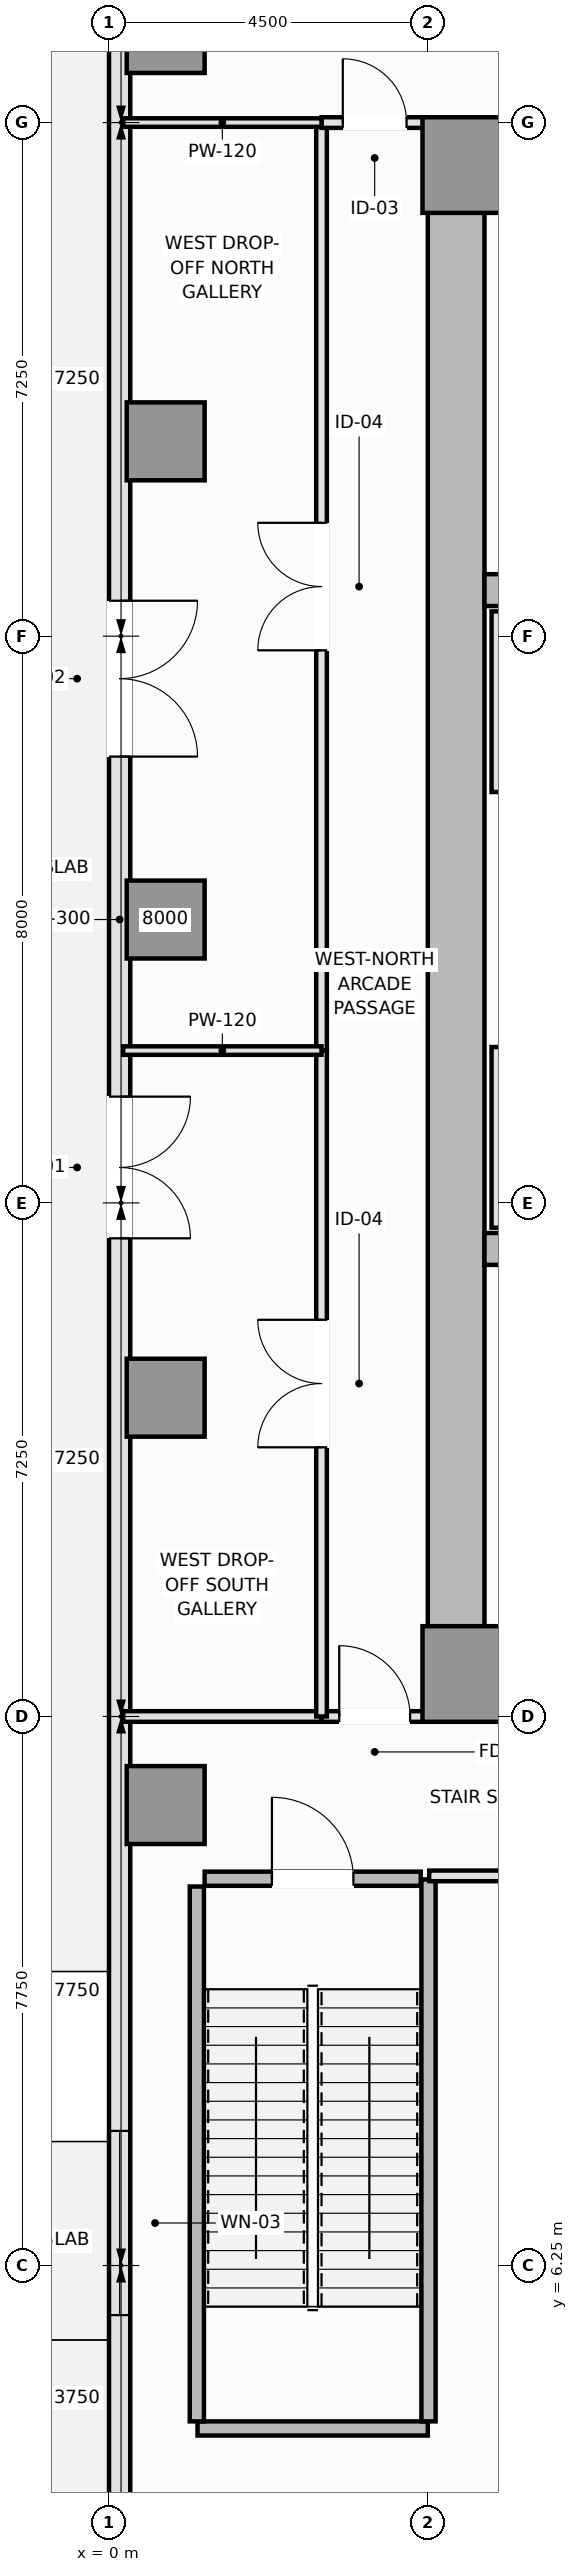
"""IFC4 building model, lengths in metres.
Left out: names, types, materials, properties, quantities, classifications, styles, units other than length and angle.
Written with IfcOpenShell. Run it as: python <this file> out.ifc"""

import sys

from ifc_helpers import new_model, si_unit, direction, frame, frame_2d, origin, origin_2d, place, context, subcontext, project, spatial, rectangle, extrude, element, fill, save


model = new_model("IFC4")
c1 = context("Model", 3, precision=1e-05, world=origin(), true_north=direction((0.0, 1.0)))
c2 = subcontext(c1, "Body", "Model", "MODEL_VIEW")
j1 = project(units=[si_unit("LENGTHUNIT", "METRE"), si_unit("PLANEANGLEUNIT", "RADIAN")], contexts=[c1])
p1 = place(None, origin())
s1 = spatial("IfcSite", under=j1, at=p1, CompositionType="ELEMENT")
p2 = place(p1, origin())
s2 = spatial("IfcBuilding", under=s1, at=p2, CompositionType="ELEMENT")
p3 = place(p2, origin())
s3 = spatial("IfcBuildingStorey", under=s2, at=p3, CompositionType="ELEMENT", Elevation=0.0)
for number, where, z_axis, x_axis in (
    (1, (4.5, 14.4, 0.0), (0.0, 0.0, 1.0), (1.0, 0.0, 0.0)),
    (2, (4.5, 36.1, 0.0), (0.0, 0.0, 1.0), (1.0, 0.0, 0.0)),
):
    element("IfcWall", number, at=place(p3, frame(where, z_axis=z_axis, x_axis=x_axis)), inside=s3, PredefinedType="SHEAR", context=c2, shape_type="SweptSolid", body=[
        extrude(rectangle(XDim=13.5, YDim=0.8, at=frame_2d((6.75, 0.0))), origin(), (0.0, 0.0, 1.0), 6.0),
    ])
p4 = place(p3, frame((4.9, 14.8, 0.0), z_axis=(0.0, 0.0, 1.0), x_axis=(0.0, 1.0, 0.0)))
e3 = element("IfcWall", 3, at=p4, inside=s3, PredefinedType="SHEAR", context=c2, shape_type="SweptSolid", body=[
    extrude(rectangle(XDim=20.9, YDim=0.8, at=frame_2d((10.45, 0.0))), origin(), (0.0, 0.0, 1.0), 6.0),
])
for number, where, z_axis, x_axis in (
    (4, (5.3, 20.6, 0.0), (0.0, 0.0, 1.0), (1.0, 0.0, 0.0)),
    (5, (5.3, 29.9, 0.0), (0.0, 0.0, 1.0), (1.0, 0.0, 0.0)),
):
    element("IfcWall", number, at=place(p3, frame(where, z_axis=z_axis, x_axis=x_axis)), inside=s3, PredefinedType="SHEAR", context=c2, shape_type="SweptSolid", body=[
        extrude(rectangle(XDim=11.9, YDim=0.45, at=frame_2d((5.95, 0.0))), origin(), (0.0, 0.0, 1.0), 6.0),
    ])
for number, where, z_axis, x_axis in (
    (6, (5.1, 14.6, 0.0), (0.0, 0.0, 1.0), (1.0, 0.0, 0.0)),
    (7, (5.1, 35.9, 0.0), (0.0, 0.0, 1.0), (1.0, 0.0, 0.0)),
):
    element("IfcColumn", number, at=place(p3, frame(where, z_axis=z_axis, x_axis=x_axis)), inside=s3, PredefinedType="PILASTER", context=c2, shape_type="SweptSolid", body=[
        extrude(rectangle(XDim=1.35, YDim=1.35, at=origin_2d()), origin(), (0.0, 0.0, 1.0), 6.0),
    ])
for number, where, z_axis, x_axis in (
    (8, (0.8, 12.75, 0.0), (0.0, 0.0, 1.0), (1.0, 0.0, 0.0)),
    (9, (0.8, 18.5, 0.0), (0.0, 0.0, 1.0), (1.0, 0.0, 0.0)),
    (10, (0.8, 25.25, 0.0), (0.0, 0.0, 1.0), (1.0, 0.0, 0.0)),
    (11, (0.8, 32.0, 0.0), (0.0, 0.0, 1.0), (1.0, 0.0, 0.0)),
    (12, (0.8, 37.75, 0.0), (0.0, 0.0, 1.0), (1.0, 0.0, 0.0)),
):
    element("IfcColumn", number, at=place(p3, frame(where, z_axis=z_axis, x_axis=x_axis)), inside=s3, PredefinedType="COLUMN", context=c2, shape_type="SweptSolid", body=[
        extrude(rectangle(XDim=1.1, YDim=1.1, at=origin_2d()), origin(), (0.0, 0.0, 1.0), 6.0),
    ])
p5 = place(p3, frame((0.15, 50.35, 0.0), z_axis=(0.0, 0.0, 1.0), x_axis=(0.0, -1.0, 0.0)))
e13 = element("IfcWall", 13, at=p5, inside=s3, PredefinedType="SOLIDWALL", context=c2, shape_type="SweptSolid", body=[
    extrude(rectangle(XDim=50.2, YDim=0.3, at=frame_2d((25.1, 0.0))), origin(), (0.0, 0.0, 1.0), 5.8),
])
p6 = place(p5, frame((5.35, 0.0, 0.0)))
e14 = element("IfcOpeningElement", 14, at=p6, cuts=e13, PredefinedType="OPENING", context=c2, shape_type="SweptSolid", body=[
    extrude(rectangle(XDim=2.0, YDim=2.4, at=frame_2d((1.0, 1.2))), frame((0.0, 0.16, 0.0), z_axis=(0.0, -1.0, 0.0), x_axis=(1.0, 0.0, 0.0)), (0.0, 0.0, 1.0), 0.32),
])
p7 = place(p5, frame((20.6, 0.0, 0.0)))
e15 = element("IfcOpeningElement", 15, at=p7, cuts=e13, PredefinedType="OPENING", context=c2, shape_type="SweptSolid", body=[
    extrude(rectangle(XDim=2.2, YDim=2.5, at=frame_2d((1.1, 1.25))), frame((0.0, 0.16, 0.0), z_axis=(0.0, -1.0, 0.0), x_axis=(1.0, 0.0, 0.0)), (0.0, 0.0, 1.0), 0.32),
])
p8 = place(p5, frame((27.6, 0.0, 0.0)))
e16 = element("IfcOpeningElement", 16, at=p8, cuts=e13, PredefinedType="OPENING", context=c2, shape_type="SweptSolid", body=[
    extrude(rectangle(XDim=2.0, YDim=2.4, at=frame_2d((1.0, 1.2))), frame((0.0, 0.16, 0.0), z_axis=(0.0, -1.0, 0.0), x_axis=(1.0, 0.0, 0.0)), (0.0, 0.0, 1.0), 0.32),
])
p9 = place(p5, frame((8.5, 0.0, 0.9)))
e17 = element("IfcOpeningElement", 17, at=p9, cuts=e13, PredefinedType="OPENING", context=c2, shape_type="SweptSolid", body=[
    extrude(rectangle(XDim=2.6, YDim=2.2, at=frame_2d((1.3, 1.1))), frame((0.0, 0.16, 0.0), z_axis=(0.0, -1.0, 0.0), x_axis=(1.0, 0.0, 0.0)), (0.0, 0.0, 1.0), 0.32),
])
p10 = place(p5, frame((42.2, 0.0, 0.9)))
e18 = element("IfcOpeningElement", 18, at=p10, cuts=e13, PredefinedType="OPENING", context=c2, shape_type="SweptSolid", body=[
    extrude(rectangle(XDim=2.6, YDim=2.2, at=frame_2d((1.3, 1.1))), frame((0.0, 0.16, 0.0), z_axis=(0.0, -1.0, 0.0), x_axis=(1.0, 0.0, 0.0)), (0.0, 0.0, 1.0), 0.32),
])
p11 = place(p3, frame((1.25, 3.95, 0.0), z_axis=(0.0, 0.0, 1.0), x_axis=(1.0, 0.0, 0.0)))
e19 = element("IfcWall", 19, at=p11, inside=s3, PredefinedType="SOLIDWALL", context=c2, shape_type="SweptSolid", body=[
    extrude(rectangle(XDim=3.25, YDim=0.2, at=frame_2d((1.625, 0.0))), origin(), (0.0, 0.0, 1.0), 6.0),
])
p12 = place(p3, frame((1.24, 4.05, 0.0), z_axis=(0.0, 0.0, 1.0), x_axis=(0.0, 1.0, 0.0)))
e20 = element("IfcWall", 20, at=p12, inside=s3, PredefinedType="SOLIDWALL", context=c2, shape_type="SweptSolid", body=[
    extrude(rectangle(XDim=7.55, YDim=0.2, at=frame_2d((3.775, 0.0))), origin(), (0.0, 0.0, 1.0), 6.0),
])
p13 = place(p3, frame((4.51, 4.05, 0.0), z_axis=(0.0, 0.0, 1.0), x_axis=(0.0, 1.0, 0.0)))
e21 = element("IfcWall", 21, at=p13, inside=s3, PredefinedType="SOLIDWALL", context=c2, shape_type="SweptSolid", body=[
    extrude(rectangle(XDim=7.65, YDim=0.2, at=frame_2d((3.825, 0.0))), origin(), (0.0, 0.0, 1.0), 6.0),
])
p14 = place(p3, frame((1.35, 11.71, 0.0), z_axis=(0.0, 0.0, 1.0), x_axis=(1.0, 0.0, 0.0)))
e22 = element("IfcWall", 22, at=p14, inside=s3, PredefinedType="SOLIDWALL", context=c2, shape_type="SweptSolid", body=[
    extrude(rectangle(XDim=3.05, YDim=0.2, at=frame_2d((1.525, 0.0))), origin(), (0.0, 0.0, 1.0), 6.0),
])
p15 = place(p14, frame((0.95, 0.0, 0.0)))
e23 = element("IfcOpeningElement", 23, at=p15, cuts=e22, PredefinedType="OPENING", context=c2, shape_type="SweptSolid", body=[
    extrude(rectangle(XDim=1.15, YDim=2.15, at=frame_2d((0.575, 1.075))), frame((0.0, 0.11, 0.0), z_axis=(0.0, -1.0, 0.0), x_axis=(1.0, 0.0, 0.0)), (0.0, 0.0, 1.0), 0.22),
])
for number, where, z_axis, x_axis in (
    (24, (5.475, 20.9, 0.0), (0.0, 0.0, 1.0), (0.0, 1.0, 0.0)),
    (25, (5.475, 27.05, 0.0), (0.0, 0.0, 1.0), (0.0, 1.0, 0.0)),
):
    element("IfcWall", number, at=place(p3, frame(where, z_axis=z_axis, x_axis=x_axis)), inside=s3, PredefinedType="PARTITIONING", context=c2, shape_type="SweptSolid", body=[
        extrude(rectangle(XDim=2.55, YDim=0.15, at=frame_2d((1.275, 0.0))), origin(), (0.0, 0.0, 1.0), 5.8),
    ])
p16 = place(p3, frame((3.0, 14.0, 0.0), z_axis=(0.0, 0.0, 1.0), x_axis=(1.0, 0.0, 0.0)))
e26 = element("IfcWall", 26, at=p16, inside=s3, PredefinedType="PARTITIONING", context=c2, shape_type="SweptSolid", body=[
    extrude(rectangle(XDim=1.5, YDim=0.15, at=frame_2d((0.75, 0.0))), origin(), (0.0, 0.0, 1.0), 5.8),
])
p17 = place(p16, frame((0.25, 0.0, 0.0)))
e27 = element("IfcOpeningElement", 27, at=p17, cuts=e26, PredefinedType="OPENING", context=c2, shape_type="SweptSolid", body=[
    extrude(rectangle(XDim=1.0, YDim=2.15, at=frame_2d((0.5, 1.075))), frame((0.0, 0.085, 0.0), z_axis=(0.0, -1.0, 0.0), x_axis=(1.0, 0.0, 0.0)), (0.0, 0.0, 1.0), 0.17),
])
p18 = place(p3, frame((4.52, 11.75, 0.0), z_axis=(0.0, 0.0, 1.0), x_axis=(1.0, 0.0, 0.0)))
e28 = element("IfcWall", 28, at=p18, inside=s3, PredefinedType="PARTITIONING", context=c2, shape_type="SweptSolid", body=[
    extrude(rectangle(XDim=8.08, YDim=0.15, at=frame_2d((4.04, 0.0))), origin(), (0.0, 0.0, 1.0), 5.8),
])
p19 = place(p18, frame((3.54, 0.0, 0.0)))
e29 = element("IfcOpeningElement", 29, at=p19, cuts=e28, PredefinedType="OPENING", context=c2, shape_type="SweptSolid", body=[
    extrude(rectangle(XDim=1.0, YDim=2.15, at=frame_2d((0.5, 1.075))), frame((0.0, 0.085, 0.0), z_axis=(0.0, -1.0, 0.0), x_axis=(1.0, 0.0, 0.0)), (0.0, 0.0, 1.0), 0.17),
])
p20 = place(p3, frame((0.2, 14.0, 0.0), z_axis=(0.0, 0.0, 1.0), x_axis=(1.0, 0.0, 0.0)))
e30 = element("IfcWall", 30, at=p20, inside=s3, PredefinedType="PARTITIONING", context=c2, shape_type="SweptSolid", body=[
    extrude(rectangle(XDim=2.8, YDim=0.15, at=frame_2d((1.4, 0.0))), origin(), (0.0, 0.0, 1.0), 5.8),
])
p21 = place(p3, frame((3.0, 14.0, 0.0), z_axis=(0.0, 0.0, 1.0), x_axis=(0.0, 1.0, 0.0)))
e31 = element("IfcWall", 31, at=p21, inside=s3, PredefinedType="PARTITIONING", context=c2, shape_type="SweptSolid", body=[
    extrude(rectangle(XDim=9.4, YDim=0.15, at=frame_2d((4.7, 0.0))), origin(), (0.0, 0.0, 1.0), 5.8),
])
p22 = place(p21, frame((3.8, 0.0, 0.0)))
e32 = element("IfcOpeningElement", 32, at=p22, cuts=e31, PredefinedType="OPENING", context=c2, shape_type="SweptSolid", body=[
    extrude(rectangle(XDim=1.8, YDim=2.2, at=frame_2d((0.9, 1.1))), frame((0.0, 0.085, 0.0), z_axis=(0.0, -1.0, 0.0), x_axis=(1.0, 0.0, 0.0)), (0.0, 0.0, 1.0), 0.17),
])
p23 = place(p3, frame((3.0, 23.4, 0.0), z_axis=(0.0, 0.0, 1.0), x_axis=(0.0, 1.0, 0.0)))
e33 = element("IfcWall", 33, at=p23, inside=s3, PredefinedType="PARTITIONING", context=c2, shape_type="SweptSolid", body=[
    extrude(rectangle(XDim=13.1, YDim=0.15, at=frame_2d((6.55, 0.0))), origin(), (0.0, 0.0, 1.0), 5.8),
])
p24 = place(p23, frame((5.65, 0.0, 0.0)))
e34 = element("IfcOpeningElement", 34, at=p24, cuts=e33, PredefinedType="OPENING", context=c2, shape_type="SweptSolid", body=[
    extrude(rectangle(XDim=1.8, YDim=2.2, at=frame_2d((0.9, 1.1))), frame((0.0, 0.085, 0.0), z_axis=(0.0, -1.0, 0.0), x_axis=(1.0, 0.0, 0.0)), (0.0, 0.0, 1.0), 0.17),
])
p25 = place(p3, frame((3.0, 36.5, 0.0), z_axis=(0.0, 0.0, 1.0), x_axis=(1.0, 0.0, 0.0)))
e35 = element("IfcWall", 35, at=p25, inside=s3, PredefinedType="PARTITIONING", context=c2, shape_type="SweptSolid", body=[
    extrude(rectangle(XDim=1.5, YDim=0.15, at=frame_2d((0.75, 0.0))), origin(), (0.0, 0.0, 1.0), 5.8),
])
p26 = place(p25, frame((0.3, 0.0, 0.0)))
e36 = element("IfcOpeningElement", 36, at=p26, cuts=e35, PredefinedType="OPENING", context=c2, shape_type="SweptSolid", body=[
    extrude(rectangle(XDim=0.9, YDim=2.1, at=frame_2d((0.45, 1.05))), frame((0.0, 0.085, 0.0), z_axis=(0.0, -1.0, 0.0), x_axis=(1.0, 0.0, 0.0)), (0.0, 0.0, 1.0), 0.17),
])
for number, where, z_axis, x_axis in (
    (37, (0.2, 23.4, 0.0), (0.0, 0.0, 1.0), (1.0, 0.0, 0.0)),
    (38, (0.2, 36.5, 0.0), (0.0, 0.0, 1.0), (1.0, 0.0, 0.0)),
):
    element("IfcWall", number, at=place(p3, frame(where, z_axis=z_axis, x_axis=x_axis)), inside=s3, PredefinedType="PARTITIONING", context=c2, shape_type="SweptSolid", body=[
        extrude(rectangle(XDim=2.8, YDim=0.12, at=frame_2d((1.4, 0.0))), origin(), (0.0, 0.0, 1.0), 5.8),
    ])
p27 = place(p7, frame((2.2, 0.0, 0.0), z_axis=(0.0, 0.0, 1.0), x_axis=(-1.0, 0.0, 0.0)))
e39 = element("IfcDoor", 39, at=p27, inside=s3, OperationType="DOUBLE_DOOR_SINGLE_SWING", PredefinedType="DOOR", context=c2, shape_type="SweptSolid", body=[
    extrude(rectangle(XDim=2.2, YDim=2.5, at=frame_2d((1.1, 1.25))), frame((0.0, 0.025, 0.0), z_axis=(0.0, -1.0, 0.0), x_axis=(1.0, 0.0, 0.0)), (0.0, 0.0, 1.0), 0.05),
])
fill(e15, e39)
p28 = place(p8, frame((2.0, 0.0, 0.0), z_axis=(0.0, 0.0, 1.0), x_axis=(-1.0, 0.0, 0.0)))
e40 = element("IfcDoor", 40, at=p28, inside=s3, OperationType="DOUBLE_DOOR_SINGLE_SWING", PredefinedType="DOOR", context=c2, shape_type="SweptSolid", body=[
    extrude(rectangle(XDim=2.0, YDim=2.4, at=frame_2d((1.0, 1.2))), frame((0.0, 0.025, 0.0), z_axis=(0.0, -1.0, 0.0), x_axis=(1.0, 0.0, 0.0)), (0.0, 0.0, 1.0), 0.05),
])
fill(e16, e40)
p29 = place(p10, origin())
e41 = element("IfcWindow", 41, at=p29, inside=s3, PartitioningType="SINGLE_PANEL", PredefinedType="WINDOW", context=c2, shape_type="SweptSolid", body=[
    extrude(rectangle(XDim=2.6, YDim=2.2, at=frame_2d((1.3, 1.1))), frame((0.0, 0.03, 0.0), z_axis=(0.0, -1.0, 0.0), x_axis=(1.0, 0.0, 0.0)), (0.0, 0.0, 1.0), 0.06),
])
fill(e18, e41)
p30 = place(p15, origin())
e42 = element("IfcDoor", 42, at=p30, inside=s3, OperationType="SINGLE_SWING_LEFT", PredefinedType="DOOR", context=c2, shape_type="SweptSolid", body=[
    extrude(rectangle(XDim=1.15, YDim=2.15, at=frame_2d((0.575, 1.075))), frame((0.0, 0.025, 0.0), z_axis=(0.0, -1.0, 0.0), x_axis=(1.0, 0.0, 0.0)), (0.0, 0.0, 1.0), 0.05),
])
fill(e23, e42)
p31 = place(p17, origin())
e43 = element("IfcDoor", 43, at=p31, inside=s3, OperationType="SINGLE_SWING_LEFT", PredefinedType="DOOR", context=c2, shape_type="SweptSolid", body=[
    extrude(rectangle(XDim=1.0, YDim=2.15, at=frame_2d((0.5, 1.075))), frame((0.0, 0.025, 0.0), z_axis=(0.0, -1.0, 0.0), x_axis=(1.0, 0.0, 0.0)), (0.0, 0.0, 1.0), 0.05),
])
fill(e27, e43)
p32 = place(p22, origin())
e44 = element("IfcDoor", 44, at=p32, inside=s3, OperationType="DOUBLE_DOOR_SINGLE_SWING", PredefinedType="DOOR", context=c2, shape_type="SweptSolid", body=[
    extrude(rectangle(XDim=1.8, YDim=2.2, at=frame_2d((0.9, 1.1))), frame((0.0, 0.025, 0.0), z_axis=(0.0, -1.0, 0.0), x_axis=(1.0, 0.0, 0.0)), (0.0, 0.0, 1.0), 0.05),
])
fill(e32, e44)
p33 = place(p24, origin())
e45 = element("IfcDoor", 45, at=p33, inside=s3, OperationType="DOUBLE_DOOR_SINGLE_SWING", PredefinedType="DOOR", context=c2, shape_type="SweptSolid", body=[
    extrude(rectangle(XDim=1.8, YDim=2.2, at=frame_2d((0.9, 1.1))), frame((0.0, 0.025, 0.0), z_axis=(0.0, -1.0, 0.0), x_axis=(1.0, 0.0, 0.0)), (0.0, 0.0, 1.0), 0.05),
])
fill(e34, e45)
p34 = place(p26, origin())
e46 = element("IfcDoor", 46, at=p34, inside=s3, OperationType="SINGLE_SWING_LEFT", PredefinedType="DOOR", context=c2, shape_type="SweptSolid", body=[
    extrude(rectangle(XDim=0.9, YDim=2.1, at=frame_2d((0.45, 1.05))), frame((0.0, 0.025, 0.0), z_axis=(0.0, -1.0, 0.0), x_axis=(1.0, 0.0, 0.0)), (0.0, 0.0, 1.0), 0.05),
])
fill(e36, e46)
save(model, sys.argv[1])
